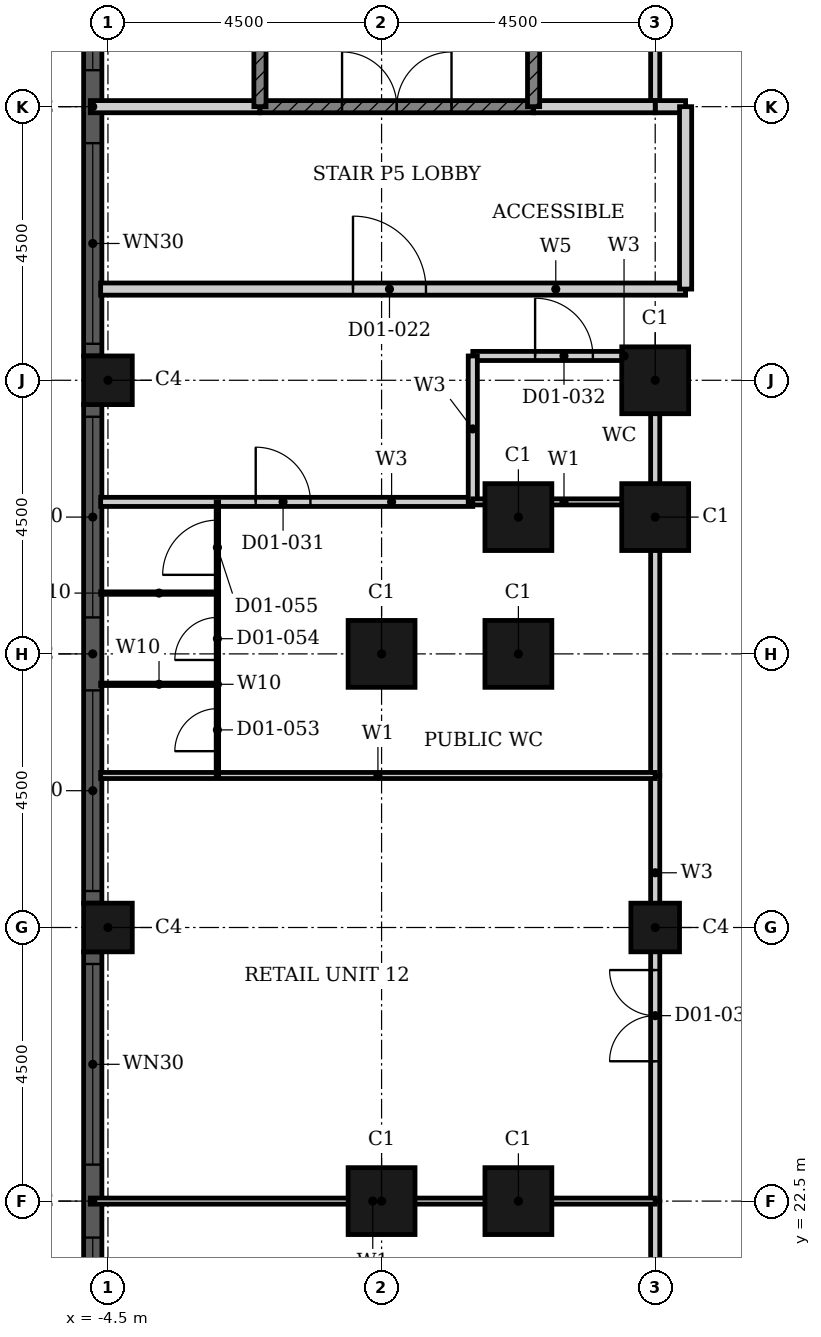
"""IFC4 building model, lengths in metres.
Left out: names, types, materials, properties, quantities, classifications, styles, units other than length and angle.
Written with IfcOpenShell. Run it as: python <this file> out.ifc"""

import sys

from ifc_helpers import new_model, si_unit, direction, frame, frame_2d, origin, origin_2d, place, context, subcontext, project, spatial, rectangle, hollow_rectangle, extrude, element, fill, save


model = new_model("IFC4")
c1 = context("Model", 3, precision=1e-05, world=origin(), true_north=direction((0.0, 1.0)))
c2 = subcontext(c1, "Body", "Model", "MODEL_VIEW")
j1 = project(units=[si_unit("LENGTHUNIT", "METRE"), si_unit("PLANEANGLEUNIT", "RADIAN")], contexts=[c1])
p1 = place(None, origin())
s1 = spatial("IfcSite", under=j1, at=p1, CompositionType="ELEMENT")
p2 = place(p1, origin())
s2 = spatial("IfcBuilding", under=s1, at=p2, CompositionType="ELEMENT")
p3 = place(p2, frame((0.0, 0.0, 6.6)))
s3 = spatial("IfcBuildingStorey", under=s2, at=p3, CompositionType="ELEMENT", Elevation=6.6)
for number, where, z_axis, x_axis in (
    (1, (4.5, 36.0, 0.0), (0.0, 0.0, 1.0), (1.0, 0.0, 0.0)),
    (2, (4.5, 33.75, 0.0), (0.0, 0.0, 1.0), (1.0, 0.0, 0.0)),
    (3, (2.25, 33.75, 0.0), (0.0, 0.0, 1.0), (1.0, 0.0, 0.0)),
    (4, (2.25, 31.5, 0.0), (0.0, 0.0, 1.0), (1.0, 0.0, 0.0)),
    (5, (0.0, 31.5, 0.0), (0.0, 0.0, 1.0), (1.0, 0.0, 0.0)),
    (6, (0.0, 22.5, 0.0), (0.0, 0.0, 1.0), (1.0, 0.0, 0.0)),
    (7, (2.25, 22.5, 0.0), (0.0, 0.0, 1.0), (1.0, 0.0, 0.0)),
):
    element("IfcColumn", number, at=place(p3, frame(where, z_axis=z_axis, x_axis=x_axis)), inside=s3, PredefinedType="COLUMN", context=c2, shape_type="SweptSolid", body=[
        extrude(hollow_rectangle(XDim=1.1, YDim=1.1, WallThickness=0.036, at=origin_2d()), origin(), (0.0, 0.0, 1.0), 5.4),
    ])
for number, where, z_axis, x_axis in (
    (8, (-4.5, 27.0, 0.0), (0.0, 0.0, 1.0), (1.0, 0.0, 0.0)),
    (9, (-4.5, 36.0, 0.0), (0.0, 0.0, 1.0), (1.0, 0.0, 0.0)),
    (10, (4.5, 27.0, 0.0), (0.0, 0.0, 1.0), (1.0, 0.0, 0.0)),
):
    element("IfcColumn", number, at=place(p3, frame(where, z_axis=z_axis, x_axis=x_axis)), inside=s3, PredefinedType="COLUMN", context=c2, shape_type="SweptSolid", body=[
        extrude(hollow_rectangle(XDim=0.8, YDim=0.8, WallThickness=0.025, at=origin_2d()), origin(), (0.0, 0.0, 1.0), 5.4),
    ])
p4 = place(p3, frame((-4.75, 44.6, 0.0), z_axis=(0.0, 0.0, 1.0), x_axis=(0.0, -1.0, 0.0)))
e11 = element("IfcWall", 11, at=p4, inside=s3, PredefinedType="SOLIDWALL", context=c2, shape_type="SweptSolid", body=[
    extrude(rectangle(XDim=8.2, YDim=0.3, at=frame_2d((4.1, 0.0))), origin(), (0.0, 0.0, 1.0), 5.4),
])
p5 = place(p4, frame((0.2, 0.0, 0.9)))
e12 = element("IfcOpeningElement", 12, at=p5, cuts=e11, PredefinedType="OPENING", context=c2, shape_type="SweptSolid", body=[
    extrude(rectangle(XDim=3.3, YDim=3.5, at=frame_2d((1.65, 1.75))), frame((0.0, 0.16, 0.0), z_axis=(0.0, -1.0, 0.0), x_axis=(1.0, 0.0, 0.0)), (0.0, 0.0, 1.0), 0.32),
])
p6 = place(p4, frame((4.7, 0.0, 0.9)))
e13 = element("IfcOpeningElement", 13, at=p6, cuts=e11, PredefinedType="OPENING", context=c2, shape_type="SweptSolid", body=[
    extrude(rectangle(XDim=3.3, YDim=3.5, at=frame_2d((1.65, 1.75))), frame((0.0, 0.16, 0.0), z_axis=(0.0, -1.0, 0.0), x_axis=(1.0, 0.0, 0.0)), (0.0, 0.0, 1.0), 0.32),
])
p7 = place(p3, frame((-4.75, 35.6, 0.0), z_axis=(0.0, 0.0, 1.0), x_axis=(0.0, -1.0, 0.0)))
e14 = element("IfcWall", 14, at=p7, inside=s3, PredefinedType="SOLIDWALL", context=c2, shape_type="SweptSolid", body=[
    extrude(rectangle(XDim=8.2, YDim=0.3, at=frame_2d((4.1, 0.0))), origin(), (0.0, 0.0, 1.0), 5.4),
])
p8 = place(p7, frame((0.2, 0.0, 0.9)))
e15 = element("IfcOpeningElement", 15, at=p8, cuts=e14, PredefinedType="OPENING", context=c2, shape_type="SweptSolid", body=[
    extrude(rectangle(XDim=3.3, YDim=3.5, at=frame_2d((1.65, 1.75))), frame((0.0, 0.16, 0.0), z_axis=(0.0, -1.0, 0.0), x_axis=(1.0, 0.0, 0.0)), (0.0, 0.0, 1.0), 0.32),
])
p9 = place(p7, frame((4.7, 0.0, 0.9)))
e16 = element("IfcOpeningElement", 16, at=p9, cuts=e14, PredefinedType="OPENING", context=c2, shape_type="SweptSolid", body=[
    extrude(rectangle(XDim=3.3, YDim=3.5, at=frame_2d((1.65, 1.75))), frame((0.0, 0.16, 0.0), z_axis=(0.0, -1.0, 0.0), x_axis=(1.0, 0.0, 0.0)), (0.0, 0.0, 1.0), 0.32),
])
p10 = place(p3, frame((-4.75, 26.6, 0.0), z_axis=(0.0, 0.0, 1.0), x_axis=(0.0, -1.0, 0.0)))
e17 = element("IfcWall", 17, at=p10, inside=s3, PredefinedType="SOLIDWALL", context=c2, shape_type="SweptSolid", body=[
    extrude(rectangle(XDim=8.2, YDim=0.3, at=frame_2d((4.1, 0.0))), origin(), (0.0, 0.0, 1.0), 5.4),
])
p11 = place(p10, frame((0.2, 0.0, 0.9)))
e18 = element("IfcOpeningElement", 18, at=p11, cuts=e17, PredefinedType="OPENING", context=c2, shape_type="SweptSolid", body=[
    extrude(rectangle(XDim=3.3, YDim=3.5, at=frame_2d((1.65, 1.75))), frame((0.0, 0.16, 0.0), z_axis=(0.0, -1.0, 0.0), x_axis=(1.0, 0.0, 0.0)), (0.0, 0.0, 1.0), 0.32),
])
p12 = place(p10, frame((4.7, 0.0, 0.9)))
e19 = element("IfcOpeningElement", 19, at=p12, cuts=e17, PredefinedType="OPENING", context=c2, shape_type="SweptSolid", body=[
    extrude(rectangle(XDim=3.3, YDim=3.5, at=frame_2d((1.65, 1.75))), frame((0.0, 0.16, 0.0), z_axis=(0.0, -1.0, 0.0), x_axis=(1.0, 0.0, 0.0)), (0.0, 0.0, 1.0), 0.32),
])
p13 = place(p3, frame((-4.62, 34.0, 0.0), z_axis=(0.0, 0.0, 1.0), x_axis=(1.0, 0.0, 0.0)))
e20 = element("IfcWall", 20, at=p13, inside=s3, PredefinedType="PARTITIONING", context=c2, shape_type="SweptSolid", body=[
    extrude(rectangle(XDim=6.12, YDim=0.15, at=frame_2d((3.06, 0.0))), origin(), (0.0, 0.0, 1.0), 5.05),
])
p14 = place(p13, frame((2.55, 0.0, 0.0)))
e21 = element("IfcOpeningElement", 21, at=p14, cuts=e20, PredefinedType="OPENING", context=c2, shape_type="SweptSolid", body=[
    extrude(rectangle(XDim=0.9, YDim=2.1, at=frame_2d((0.45, 1.05))), frame((0.0, 0.085, 0.0), z_axis=(0.0, -1.0, 0.0), x_axis=(1.0, 0.0, 0.0)), (0.0, 0.0, 1.0), 0.17),
])
p15 = place(p3, frame((1.5, 36.4, 0.0), z_axis=(0.0, 0.0, 1.0), x_axis=(1.0, 0.0, 0.0)))
e22 = element("IfcWall", 22, at=p15, inside=s3, PredefinedType="PARTITIONING", context=c2, shape_type="SweptSolid", body=[
    extrude(rectangle(XDim=3.0, YDim=0.15, at=frame_2d((1.5, 0.0))), origin(), (0.0, 0.0, 1.0), 5.05),
])
p16 = place(p15, frame((1.025, 0.0, 0.0)))
e23 = element("IfcOpeningElement", 23, at=p16, cuts=e22, PredefinedType="OPENING", context=c2, shape_type="SweptSolid", body=[
    extrude(rectangle(XDim=0.95, YDim=2.1, at=frame_2d((0.475, 1.05))), frame((0.0, 0.085, 0.0), z_axis=(0.0, -1.0, 0.0), x_axis=(1.0, 0.0, 0.0)), (0.0, 0.0, 1.0), 0.17),
])
p17 = place(p3, frame((1.5, 34.0, 0.0), z_axis=(0.0, 0.0, 1.0), x_axis=(0.0, 1.0, 0.0)))
e24 = element("IfcWall", 24, at=p17, inside=s3, PredefinedType="PARTITIONING", context=c2, shape_type="SweptSolid", body=[
    extrude(rectangle(XDim=2.4, YDim=0.15, at=frame_2d((1.2, 0.0))), origin(), (0.0, 0.0, 1.0), 5.05),
])
p18 = place(p3, frame((4.5, 9.0, 0.0), z_axis=(0.0, 0.0, 1.0), x_axis=(0.0, 1.0, 0.0)))
e25 = element("IfcWall", 25, at=p18, inside=s3, PredefinedType="PARTITIONING", context=c2, shape_type="SweptSolid", body=[
    extrude(rectangle(XDim=13.5, YDim=0.15, at=frame_2d((6.75, 0.0))), origin(), (0.0, 0.0, 1.0), 5.05),
])
p19 = place(p18, frame((6.0, 0.0, 0.0)))
e26 = element("IfcOpeningElement", 26, at=p19, cuts=e25, PredefinedType="OPENING", context=c2, shape_type="SweptSolid", body=[
    extrude(rectangle(XDim=1.5, YDim=2.4, at=frame_2d((0.75, 1.2))), frame((0.0, 0.085, 0.0), z_axis=(0.0, -1.0, 0.0), x_axis=(1.0, 0.0, 0.0)), (0.0, 0.0, 1.0), 0.17),
])
p20 = place(p3, frame((4.5, 22.5, 0.0), z_axis=(0.0, 0.0, 1.0), x_axis=(0.0, 1.0, 0.0)))
e27 = element("IfcWall", 27, at=p20, inside=s3, PredefinedType="PARTITIONING", context=c2, shape_type="SweptSolid", body=[
    extrude(rectangle(XDim=7.0, YDim=0.15, at=frame_2d((3.5, 0.0))), origin(), (0.0, 0.0, 1.0), 5.05),
])
p21 = place(p20, frame((2.3, 0.0, 0.0)))
e28 = element("IfcOpeningElement", 28, at=p21, cuts=e27, PredefinedType="OPENING", context=c2, shape_type="SweptSolid", body=[
    extrude(rectangle(XDim=1.5, YDim=2.4, at=frame_2d((0.75, 1.2))), frame((0.0, 0.085, 0.0), z_axis=(0.0, -1.0, 0.0), x_axis=(1.0, 0.0, 0.0)), (0.0, 0.0, 1.0), 0.17),
])
p22 = place(p3, frame((4.5, 29.5, 0.0), z_axis=(0.0, 0.0, 1.0), x_axis=(0.0, 1.0, 0.0)))
e29 = element("IfcWall", 29, at=p22, inside=s3, PredefinedType="PARTITIONING", context=c2, shape_type="SweptSolid", body=[
    extrude(rectangle(XDim=4.5, YDim=0.15, at=frame_2d((2.25, 0.0))), origin(), (0.0, 0.0, 1.0), 5.05),
])
p23 = place(p3, frame((4.5, 34.0, 0.0), z_axis=(0.0, 0.0, 1.0), x_axis=(0.0, 1.0, 0.0)))
e30 = element("IfcWall", 30, at=p23, inside=s3, PredefinedType="PARTITIONING", context=c2, shape_type="SweptSolid", body=[
    extrude(rectangle(XDim=2.4, YDim=0.15, at=frame_2d((1.2, 0.0))), origin(), (0.0, 0.0, 1.0), 5.05),
])
p24 = place(p3, frame((4.5, 40.5, 0.0), z_axis=(0.0, 0.0, 1.0), x_axis=(0.0, 1.0, 0.0)))
e31 = element("IfcWall", 31, at=p24, inside=s3, PredefinedType="PARTITIONING", context=c2, shape_type="SweptSolid", body=[
    extrude(rectangle(XDim=13.69, YDim=0.15, at=frame_2d((6.845, 0.0))), origin(), (0.0, 0.0, 1.0), 5.05),
])
p25 = place(p24, frame((6.0, 0.0, 0.0)))
e32 = element("IfcOpeningElement", 32, at=p25, cuts=e31, PredefinedType="OPENING", context=c2, shape_type="SweptSolid", body=[
    extrude(rectangle(XDim=1.5, YDim=2.4, at=frame_2d((0.75, 1.2))), frame((0.0, 0.085, 0.0), z_axis=(0.0, -1.0, 0.0), x_axis=(1.0, 0.0, 0.0)), (0.0, 0.0, 1.0), 0.17),
])
p26 = place(p3, frame((-4.79, 22.5, 0.0), z_axis=(0.0, 0.0, 1.0), x_axis=(1.0, 0.0, 0.0)))
e33 = element("IfcWall", 33, at=p26, inside=s3, PredefinedType="PARTITIONING", context=c2, shape_type="SweptSolid", body=[
    extrude(rectangle(XDim=9.29, YDim=0.1, at=frame_2d((4.645, 0.0))), origin(), (0.0, 0.0, 1.0), 5.05),
])
p27 = place(p3, frame((-4.62, 29.5, 0.0), z_axis=(0.0, 0.0, 1.0), x_axis=(1.0, 0.0, 0.0)))
e34 = element("IfcWall", 34, at=p27, inside=s3, PredefinedType="PARTITIONING", context=c2, shape_type="SweptSolid", body=[
    extrude(rectangle(XDim=9.12, YDim=0.1, at=frame_2d((4.56, 0.0))), origin(), (0.0, 0.0, 1.0), 5.05),
])
p28 = place(p3, frame((1.5, 34.0, 0.0), z_axis=(0.0, 0.0, 1.0), x_axis=(1.0, 0.0, 0.0)))
e35 = element("IfcWall", 35, at=p28, inside=s3, PredefinedType="PARTITIONING", context=c2, shape_type="SweptSolid", body=[
    extrude(rectangle(XDim=3.0, YDim=0.1, at=frame_2d((1.5, 0.0))), origin(), (0.0, 0.0, 1.0), 5.05),
])
p29 = place(p3, frame((-4.62, 37.5, 0.0), z_axis=(0.0, 0.0, 1.0), x_axis=(1.0, 0.0, 0.0)))
e36 = element("IfcWall", 36, at=p29, inside=s3, PredefinedType="PARTITIONING", context=c2, shape_type="SweptSolid", body=[
    extrude(rectangle(XDim=9.62, YDim=0.2, at=frame_2d((4.81, 0.0))), origin(), (0.0, 0.0, 1.0), 5.05),
])
p30 = place(p29, frame((4.15, 0.0, 0.0)))
e37 = element("IfcOpeningElement", 37, at=p30, cuts=e36, PredefinedType="OPENING", context=c2, shape_type="SweptSolid", body=[
    extrude(rectangle(XDim=1.2, YDim=2.1, at=frame_2d((0.6, 1.05))), frame((0.0, 0.11, 0.0), z_axis=(0.0, -1.0, 0.0), x_axis=(1.0, 0.0, 0.0)), (0.0, 0.0, 1.0), 0.22),
])
p31 = place(p3, frame((4.5, 40.5, 0.0), z_axis=(0.0, 0.0, 1.0), x_axis=(1.0, 0.0, 0.0)))
e38 = element("IfcWall", 38, at=p31, inside=s3, PredefinedType="PARTITIONING", context=c2, shape_type="SweptSolid", body=[
    extrude(rectangle(XDim=0.5, YDim=0.2, at=frame_2d((0.25, 0.0))), origin(), (0.0, 0.0, 1.0), 5.05),
])
p32 = place(p3, frame((-4.79, 40.5, 0.0), z_axis=(0.0, 0.0, 1.0), x_axis=(1.0, 0.0, 0.0)))
e39 = element("IfcWall", 39, at=p32, inside=s3, PredefinedType="PARTITIONING", context=c2, shape_type="SweptSolid", body=[
    extrude(rectangle(XDim=2.79, YDim=0.2, at=frame_2d((1.395, 0.0))), origin(), (0.0, 0.0, 1.0), 5.05),
])
p33 = place(p3, frame((2.5, 40.5, 0.0), z_axis=(0.0, 0.0, 1.0), x_axis=(1.0, 0.0, 0.0)))
e40 = element("IfcWall", 40, at=p33, inside=s3, PredefinedType="PARTITIONING", context=c2, shape_type="SweptSolid", body=[
    extrude(rectangle(XDim=2.0, YDim=0.2, at=frame_2d((1.0, 0.0))), origin(), (0.0, 0.0, 1.0), 5.05),
])
p34 = place(p3, frame((5.0, 37.5, 0.0), z_axis=(0.0, 0.0, 1.0), x_axis=(0.0, 1.0, 0.0)))
e41 = element("IfcWall", 41, at=p34, inside=s3, PredefinedType="PARTITIONING", context=c2, shape_type="SweptSolid", body=[
    extrude(rectangle(XDim=3.0, YDim=0.2, at=frame_2d((1.5, 0.0))), origin(), (0.0, 0.0, 1.0), 5.05),
])
p35 = place(p3, frame((-2.0, 40.5, 0.0), z_axis=(0.0, 0.0, 1.0), x_axis=(1.0, 0.0, 0.0)))
e42 = element("IfcWall", 42, at=p35, inside=s3, PredefinedType="SHEAR", context=c2, shape_type="SweptSolid", body=[
    extrude(rectangle(XDim=4.5, YDim=0.2, at=frame_2d((2.25, 0.0))), origin(), (0.0, 0.0, 1.0), 5.05),
])
p36 = place(p35, frame((1.35, 0.0, 0.0)))
e43 = element("IfcOpeningElement", 43, at=p36, cuts=e42, PredefinedType="OPENING", context=c2, shape_type="SweptSolid", body=[
    extrude(rectangle(XDim=1.8, YDim=2.1, at=frame_2d((0.9, 1.05))), frame((0.0, 0.11, 0.0), z_axis=(0.0, -1.0, 0.0), x_axis=(1.0, 0.0, 0.0)), (0.0, 0.0, 1.0), 0.22),
])
for number, where, z_axis, x_axis in (
    (44, (-2.0, 40.5, 0.0), (0.0, 0.0, 1.0), (0.0, 1.0, 0.0)),
    (45, (2.5, 40.5, 0.0), (0.0, 0.0, 1.0), (0.0, 1.0, 0.0)),
):
    element("IfcWall", number, at=place(p3, frame(where, z_axis=z_axis, x_axis=x_axis)), inside=s3, PredefinedType="SHEAR", context=c2, shape_type="SweptSolid", body=[
        extrude(rectangle(XDim=8.45, YDim=0.2, at=frame_2d((4.225, 0.0))), origin(), (0.0, 0.0, 1.0), 5.05),
    ])
for number, where, z_axis, x_axis in (
    (46, (-4.62, 31.0, 0.0), (0.0, 0.0, 1.0), (1.0, 0.0, 0.0)),
    (47, (-4.62, 32.5, 0.0), (0.0, 0.0, 1.0), (1.0, 0.0, 0.0)),
):
    element("IfcWall", number, at=place(p3, frame(where, z_axis=z_axis, x_axis=x_axis)), inside=s3, PredefinedType="PARTITIONING", context=c2, shape_type="SweptSolid", body=[
        extrude(rectangle(XDim=1.92, YDim=0.04, at=frame_2d((0.96, 0.0))), origin(), (0.0, 0.0, 1.0), 5.05),
    ])
p37 = place(p3, frame((-2.7, 29.5, 0.0), z_axis=(0.0, 0.0, 1.0), x_axis=(0.0, 1.0, 0.0)))
e48 = element("IfcWall", 48, at=p37, inside=s3, PredefinedType="PARTITIONING", context=c2, shape_type="SweptSolid", body=[
    extrude(rectangle(XDim=4.5, YDim=0.04, at=frame_2d((2.25, 0.0))), origin(), (0.0, 0.0, 1.0), 5.05),
])
p38 = place(p37, frame((0.4, 0.0, 0.0)))
e49 = element("IfcOpeningElement", 49, at=p38, cuts=e48, PredefinedType="OPENING", context=c2, shape_type="SweptSolid", body=[
    extrude(rectangle(XDim=0.7, YDim=2.0, at=frame_2d((0.35, 1.0))), frame((0.0, 0.03, 0.0), z_axis=(0.0, -1.0, 0.0), x_axis=(1.0, 0.0, 0.0)), (0.0, 0.0, 1.0), 0.06),
])
p39 = place(p37, frame((1.9, 0.0, 0.0)))
e50 = element("IfcOpeningElement", 50, at=p39, cuts=e48, PredefinedType="OPENING", context=c2, shape_type="SweptSolid", body=[
    extrude(rectangle(XDim=0.7, YDim=2.0, at=frame_2d((0.35, 1.0))), frame((0.0, 0.03, 0.0), z_axis=(0.0, -1.0, 0.0), x_axis=(1.0, 0.0, 0.0)), (0.0, 0.0, 1.0), 0.06),
])
p40 = place(p37, frame((3.3, 0.0, 0.0)))
e51 = element("IfcOpeningElement", 51, at=p40, cuts=e48, PredefinedType="OPENING", context=c2, shape_type="SweptSolid", body=[
    extrude(rectangle(XDim=0.9, YDim=2.0, at=frame_2d((0.45, 1.0))), frame((0.0, 0.03, 0.0), z_axis=(0.0, -1.0, 0.0), x_axis=(1.0, 0.0, 0.0)), (0.0, 0.0, 1.0), 0.06),
])
p41 = place(p5, origin())
e52 = element("IfcWindow", 52, at=p41, inside=s3, PartitioningType="SINGLE_PANEL", PredefinedType="WINDOW", context=c2, shape_type="SweptSolid", body=[
    extrude(rectangle(XDim=3.3, YDim=3.5, at=frame_2d((1.65, 1.75))), frame((0.0, 0.03, 0.0), z_axis=(0.0, -1.0, 0.0), x_axis=(1.0, 0.0, 0.0)), (0.0, 0.0, 1.0), 0.06),
])
fill(e12, e52)
p42 = place(p6, origin())
e53 = element("IfcWindow", 53, at=p42, inside=s3, PartitioningType="SINGLE_PANEL", PredefinedType="WINDOW", context=c2, shape_type="SweptSolid", body=[
    extrude(rectangle(XDim=3.3, YDim=3.5, at=frame_2d((1.65, 1.75))), frame((0.0, 0.03, 0.0), z_axis=(0.0, -1.0, 0.0), x_axis=(1.0, 0.0, 0.0)), (0.0, 0.0, 1.0), 0.06),
])
fill(e13, e53)
p43 = place(p8, origin())
e54 = element("IfcWindow", 54, at=p43, inside=s3, PartitioningType="SINGLE_PANEL", PredefinedType="WINDOW", context=c2, shape_type="SweptSolid", body=[
    extrude(rectangle(XDim=3.3, YDim=3.5, at=frame_2d((1.65, 1.75))), frame((0.0, 0.03, 0.0), z_axis=(0.0, -1.0, 0.0), x_axis=(1.0, 0.0, 0.0)), (0.0, 0.0, 1.0), 0.06),
])
fill(e15, e54)
p44 = place(p9, origin())
e55 = element("IfcWindow", 55, at=p44, inside=s3, PartitioningType="SINGLE_PANEL", PredefinedType="WINDOW", context=c2, shape_type="SweptSolid", body=[
    extrude(rectangle(XDim=3.3, YDim=3.5, at=frame_2d((1.65, 1.75))), frame((0.0, 0.03, 0.0), z_axis=(0.0, -1.0, 0.0), x_axis=(1.0, 0.0, 0.0)), (0.0, 0.0, 1.0), 0.06),
])
fill(e16, e55)
p45 = place(p11, origin())
e56 = element("IfcWindow", 56, at=p45, inside=s3, PartitioningType="SINGLE_PANEL", PredefinedType="WINDOW", context=c2, shape_type="SweptSolid", body=[
    extrude(rectangle(XDim=3.3, YDim=3.5, at=frame_2d((1.65, 1.75))), frame((0.0, 0.03, 0.0), z_axis=(0.0, -1.0, 0.0), x_axis=(1.0, 0.0, 0.0)), (0.0, 0.0, 1.0), 0.06),
])
fill(e18, e56)
p46 = place(p12, origin())
e57 = element("IfcWindow", 57, at=p46, inside=s3, PartitioningType="SINGLE_PANEL", PredefinedType="WINDOW", context=c2, shape_type="SweptSolid", body=[
    extrude(rectangle(XDim=3.3, YDim=3.5, at=frame_2d((1.65, 1.75))), frame((0.0, 0.03, 0.0), z_axis=(0.0, -1.0, 0.0), x_axis=(1.0, 0.0, 0.0)), (0.0, 0.0, 1.0), 0.06),
])
fill(e19, e57)
p47 = place(p30, origin())
e58 = element("IfcDoor", 58, at=p47, inside=s3, OperationType="SINGLE_SWING_LEFT", PredefinedType="DOOR", context=c2, shape_type="SweptSolid", body=[
    extrude(rectangle(XDim=1.2, YDim=2.1, at=frame_2d((0.6, 1.05))), frame((0.0, 0.025, 0.0), z_axis=(0.0, -1.0, 0.0), x_axis=(1.0, 0.0, 0.0)), (0.0, 0.0, 1.0), 0.05),
])
fill(e37, e58)
p48 = place(p36, origin())
e59 = element("IfcDoor", 59, at=p48, inside=s3, OperationType="DOUBLE_DOOR_SINGLE_SWING", PredefinedType="DOOR", context=c2, shape_type="SweptSolid", body=[
    extrude(rectangle(XDim=1.8, YDim=2.1, at=frame_2d((0.9, 1.05))), frame((0.0, 0.025, 0.0), z_axis=(0.0, -1.0, 0.0), x_axis=(1.0, 0.0, 0.0)), (0.0, 0.0, 1.0), 0.05),
])
fill(e43, e59)
p49 = place(p21, origin())
e60 = element("IfcDoor", 60, at=p49, inside=s3, OperationType="DOUBLE_DOOR_SINGLE_SWING", PredefinedType="DOOR", context=c2, shape_type="SweptSolid", body=[
    extrude(rectangle(XDim=1.5, YDim=2.4, at=frame_2d((0.75, 1.2))), frame((0.0, 0.025, 0.0), z_axis=(0.0, -1.0, 0.0), x_axis=(1.0, 0.0, 0.0)), (0.0, 0.0, 1.0), 0.05),
])
fill(e28, e60)
p50 = place(p14, origin())
e61 = element("IfcDoor", 61, at=p50, inside=s3, OperationType="SINGLE_SWING_RIGHT", PredefinedType="DOOR", context=c2, shape_type="SweptSolid", body=[
    extrude(rectangle(XDim=0.9, YDim=2.1, at=frame_2d((0.45, 1.05))), frame((0.0, 0.025, 0.0), z_axis=(0.0, -1.0, 0.0), x_axis=(1.0, 0.0, 0.0)), (0.0, 0.0, 1.0), 0.05),
])
fill(e21, e61)
p51 = place(p16, origin())
e62 = element("IfcDoor", 62, at=p51, inside=s3, OperationType="SINGLE_SWING_LEFT", PredefinedType="DOOR", context=c2, shape_type="SweptSolid", body=[
    extrude(rectangle(XDim=0.95, YDim=2.1, at=frame_2d((0.475, 1.05))), frame((0.0, 0.025, 0.0), z_axis=(0.0, -1.0, 0.0), x_axis=(1.0, 0.0, 0.0)), (0.0, 0.0, 1.0), 0.05),
])
fill(e23, e62)
p52 = place(p38, origin())
e63 = element("IfcDoor", 63, at=p52, inside=s3, OperationType="SINGLE_SWING_LEFT", PredefinedType="DOOR", context=c2, shape_type="SweptSolid", body=[
    extrude(rectangle(XDim=0.7, YDim=2.0, at=frame_2d((0.35, 1.0))), frame((0.0, 0.02, 0.0), z_axis=(0.0, -1.0, 0.0), x_axis=(1.0, 0.0, 0.0)), (0.0, 0.0, 1.0), 0.04),
])
fill(e49, e63)
p53 = place(p39, origin())
e64 = element("IfcDoor", 64, at=p53, inside=s3, OperationType="SINGLE_SWING_RIGHT", PredefinedType="DOOR", context=c2, shape_type="SweptSolid", body=[
    extrude(rectangle(XDim=0.7, YDim=2.0, at=frame_2d((0.35, 1.0))), frame((0.0, 0.02, 0.0), z_axis=(0.0, -1.0, 0.0), x_axis=(1.0, 0.0, 0.0)), (0.0, 0.0, 1.0), 0.04),
])
fill(e50, e64)
p54 = place(p40, origin())
e65 = element("IfcDoor", 65, at=p54, inside=s3, OperationType="SINGLE_SWING_RIGHT", PredefinedType="DOOR", context=c2, shape_type="SweptSolid", body=[
    extrude(rectangle(XDim=0.9, YDim=2.0, at=frame_2d((0.45, 1.0))), frame((0.0, 0.02, 0.0), z_axis=(0.0, -1.0, 0.0), x_axis=(1.0, 0.0, 0.0)), (0.0, 0.0, 1.0), 0.04),
])
fill(e51, e65)
save(model, sys.argv[1])
